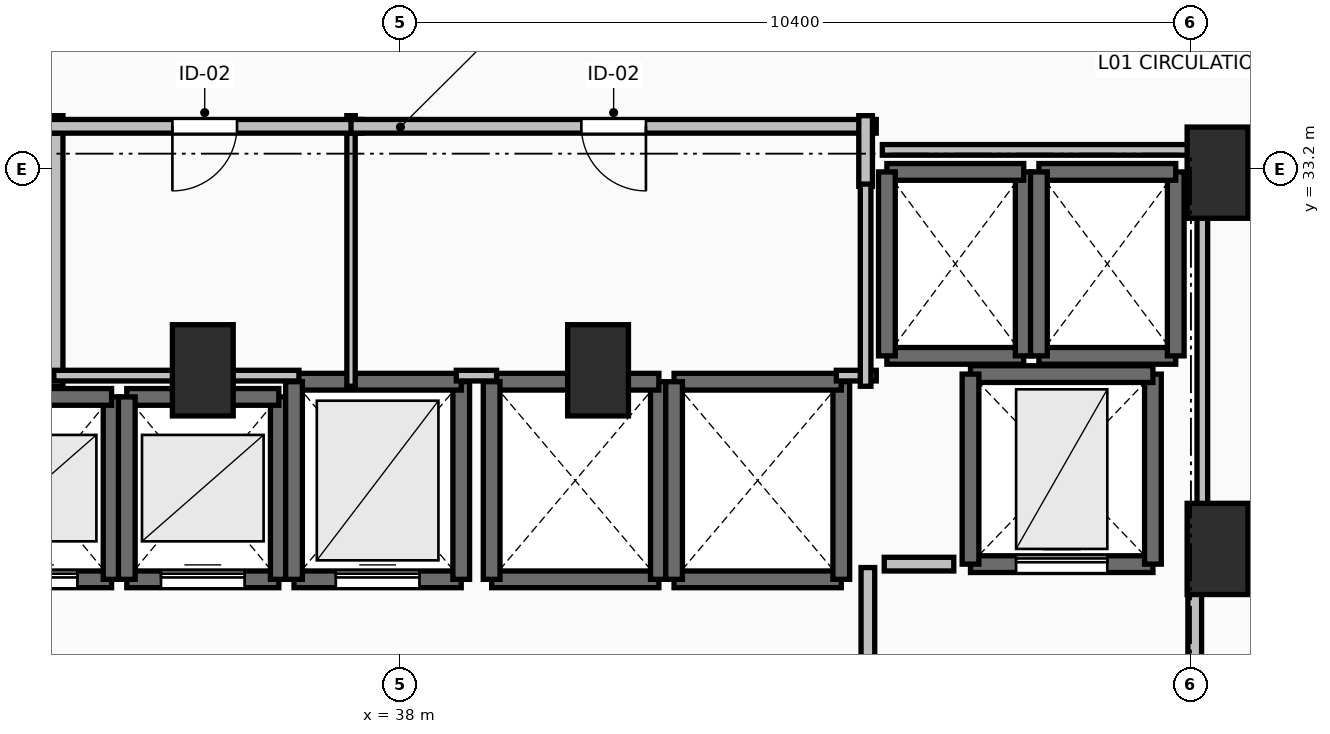
"""IFC4 building model, lengths in metres.
Left out: names, types, materials, properties, quantities, classifications, styles, units other than length and angle.
Written with IfcOpenShell. Run it as: python <this file> out.ifc"""

import sys

from ifc_helpers import new_model, si_unit, direction, frame, frame_2d, origin, origin_2d, place, context, subcontext, project, spatial, rectangle, extrude, element, fill, save


model = new_model("IFC4")
c1 = context("Model", 3, precision=1e-05, world=origin(), true_north=direction((0.0, 1.0)))
c2 = subcontext(c1, "Body", "Model", "MODEL_VIEW")
j1 = project(units=[si_unit("LENGTHUNIT", "METRE"), si_unit("PLANEANGLEUNIT", "RADIAN")], contexts=[c1])
p1 = place(None, origin())
s1 = spatial("IfcSite", under=j1, at=p1, CompositionType="ELEMENT")
p2 = place(p1, origin())
s2 = spatial("IfcBuilding", under=s1, at=p2, CompositionType="ELEMENT")
p3 = place(p2, frame((0.0, 0.0, 4.8)))
s3 = spatial("IfcBuildingStorey", under=s2, at=p3, CompositionType="ELEMENT", Elevation=4.8)
for number, where, z_axis, x_axis in (
    (1, (48.75, 33.15, 0.0), (0.0, 0.0, 1.0), (1.0, 0.0, 0.0)),
    (2, (48.75, 28.2, 0.0), (0.0, 0.0, 1.0), (1.0, 0.0, 0.0)),
    (3, (35.4, 30.55, 0.0), (0.0, 0.0, 1.0), (1.0, 0.0, 0.0)),
    (4, (40.6, 30.55, 0.0), (0.0, 0.0, 1.0), (1.0, 0.0, 0.0)),
):
    element("IfcColumn", number, at=place(p3, frame(where, z_axis=z_axis, x_axis=x_axis)), inside=s3, PredefinedType="PILASTER", context=c2, shape_type="SweptSolid", body=[
        extrude(rectangle(XDim=0.8, YDim=1.2, at=origin_2d()), origin(), (0.0, 0.0, 1.0), 4.8),
    ])
p4 = place(p3, frame((32.2, 27.8, 0.0), z_axis=(0.0, 0.0, 1.0), x_axis=(1.0, 0.0, 0.0)))
e5 = element("IfcWall", 5, at=p4, inside=s3, PredefinedType="SOLIDWALL", context=c2, shape_type="SweptSolid", body=[
    extrude(rectangle(XDim=2.0, YDim=0.22, at=frame_2d((1.0, 0.0))), origin(), (0.0, 0.0, 1.0), 4.48),
])
p5 = place(p4, frame((0.45, 0.0, 0.0)))
e6 = element("IfcOpeningElement", 6, at=p5, cuts=e5, PredefinedType="OPENING", context=c2, shape_type="SweptSolid", body=[
    extrude(rectangle(XDim=1.1, YDim=2.2, at=frame_2d((0.55, 1.1))), frame((0.0, 0.125, 0.0), z_axis=(0.0, -1.0, 0.0), x_axis=(1.0, 0.0, 0.0)), (0.0, 0.0, 1.0), 0.25),
])
p6 = place(p3, frame((34.2, 27.8, 0.0), z_axis=(0.0, 0.0, 1.0), x_axis=(0.0, 1.0, 0.0)))
e7 = element("IfcWall", 7, at=p6, inside=s3, PredefinedType="SOLIDWALL", context=c2, shape_type="SweptSolid", body=[
    extrude(rectangle(XDim=2.4, YDim=0.22, at=frame_2d((1.2, 0.0))), origin(), (0.0, 0.0, 1.0), 4.48),
])
p7 = place(p3, frame((34.2, 30.2, 0.0), z_axis=(0.0, 0.0, 1.0), x_axis=(-1.0, 0.0, 0.0)))
e8 = element("IfcWall", 8, at=p7, inside=s3, PredefinedType="SOLIDWALL", context=c2, shape_type="SweptSolid", body=[
    extrude(rectangle(XDim=2.0, YDim=0.22, at=frame_2d((1.0, 0.0))), origin(), (0.0, 0.0, 1.0), 4.48),
])
p8 = place(p3, frame((34.4, 27.8, 0.0), z_axis=(0.0, 0.0, 1.0), x_axis=(1.0, 0.0, 0.0)))
e9 = element("IfcWall", 9, at=p8, inside=s3, PredefinedType="SOLIDWALL", context=c2, shape_type="SweptSolid", body=[
    extrude(rectangle(XDim=2.0, YDim=0.22, at=frame_2d((1.0, 0.0))), origin(), (0.0, 0.0, 1.0), 4.48),
])
p9 = place(p8, frame((0.45, 0.0, 0.0)))
e10 = element("IfcOpeningElement", 10, at=p9, cuts=e9, PredefinedType="OPENING", context=c2, shape_type="SweptSolid", body=[
    extrude(rectangle(XDim=1.1, YDim=2.2, at=frame_2d((0.55, 1.1))), frame((0.0, 0.125, 0.0), z_axis=(0.0, -1.0, 0.0), x_axis=(1.0, 0.0, 0.0)), (0.0, 0.0, 1.0), 0.25),
])
p10 = place(p3, frame((36.4, 27.8, 0.0), z_axis=(0.0, 0.0, 1.0), x_axis=(0.0, 1.0, 0.0)))
e11 = element("IfcWall", 11, at=p10, inside=s3, PredefinedType="SOLIDWALL", context=c2, shape_type="SweptSolid", body=[
    extrude(rectangle(XDim=2.4, YDim=0.22, at=frame_2d((1.2, 0.0))), origin(), (0.0, 0.0, 1.0), 4.48),
])
p11 = place(p3, frame((36.4, 30.2, 0.0), z_axis=(0.0, 0.0, 1.0), x_axis=(-1.0, 0.0, 0.0)))
e12 = element("IfcWall", 12, at=p11, inside=s3, PredefinedType="SOLIDWALL", context=c2, shape_type="SweptSolid", body=[
    extrude(rectangle(XDim=2.0, YDim=0.22, at=frame_2d((1.0, 0.0))), origin(), (0.0, 0.0, 1.0), 4.48),
])
p12 = place(p3, frame((34.4, 30.2, 0.0), z_axis=(0.0, 0.0, 1.0), x_axis=(0.0, -1.0, 0.0)))
e13 = element("IfcWall", 13, at=p12, inside=s3, PredefinedType="SOLIDWALL", context=c2, shape_type="SweptSolid", body=[
    extrude(rectangle(XDim=2.4, YDim=0.22, at=frame_2d((1.2, 0.0))), origin(), (0.0, 0.0, 1.0), 4.48),
])
p13 = place(p3, frame((36.6, 27.8, 0.0), z_axis=(0.0, 0.0, 1.0), x_axis=(1.0, 0.0, 0.0)))
e14 = element("IfcWall", 14, at=p13, inside=s3, PredefinedType="SOLIDWALL", context=c2, shape_type="SweptSolid", body=[
    extrude(rectangle(XDim=2.2, YDim=0.22, at=frame_2d((1.1, 0.0))), origin(), (0.0, 0.0, 1.0), 4.48),
])
p14 = place(p13, frame((0.55, 0.0, 0.0)))
e15 = element("IfcOpeningElement", 15, at=p14, cuts=e14, PredefinedType="OPENING", context=c2, shape_type="SweptSolid", body=[
    extrude(rectangle(XDim=1.1, YDim=2.2, at=frame_2d((0.55, 1.1))), frame((0.0, 0.125, 0.0), z_axis=(0.0, -1.0, 0.0), x_axis=(1.0, 0.0, 0.0)), (0.0, 0.0, 1.0), 0.25),
])
p15 = place(p3, frame((38.8, 27.8, 0.0), z_axis=(0.0, 0.0, 1.0), x_axis=(0.0, 1.0, 0.0)))
e16 = element("IfcWall", 16, at=p15, inside=s3, PredefinedType="SOLIDWALL", context=c2, shape_type="SweptSolid", body=[
    extrude(rectangle(XDim=2.6, YDim=0.22, at=frame_2d((1.3, 0.0))), origin(), (0.0, 0.0, 1.0), 4.48),
])
p16 = place(p3, frame((38.8, 30.4, 0.0), z_axis=(0.0, 0.0, 1.0), x_axis=(-1.0, 0.0, 0.0)))
e17 = element("IfcWall", 17, at=p16, inside=s3, PredefinedType="SOLIDWALL", context=c2, shape_type="SweptSolid", body=[
    extrude(rectangle(XDim=2.2, YDim=0.22, at=frame_2d((1.1, 0.0))), origin(), (0.0, 0.0, 1.0), 4.48),
])
p17 = place(p3, frame((36.6, 30.4, 0.0), z_axis=(0.0, 0.0, 1.0), x_axis=(0.0, -1.0, 0.0)))
e18 = element("IfcWall", 18, at=p17, inside=s3, PredefinedType="SOLIDWALL", context=c2, shape_type="SweptSolid", body=[
    extrude(rectangle(XDim=2.6, YDim=0.22, at=frame_2d((1.3, 0.0))), origin(), (0.0, 0.0, 1.0), 4.48),
])
p18 = place(p3, frame((39.2, 27.8, 0.0), z_axis=(0.0, 0.0, 1.0), x_axis=(1.0, 0.0, 0.0)))
e19 = element("IfcWall", 19, at=p18, inside=s3, PredefinedType="SOLIDWALL", context=c2, shape_type="SweptSolid", body=[
    extrude(rectangle(XDim=2.2, YDim=0.22, at=frame_2d((1.1, 0.0))), origin(), (0.0, 0.0, 1.0), 4.48),
])
p19 = place(p3, frame((41.4, 27.8, 0.0), z_axis=(0.0, 0.0, 1.0), x_axis=(0.0, 1.0, 0.0)))
e20 = element("IfcWall", 20, at=p19, inside=s3, PredefinedType="SOLIDWALL", context=c2, shape_type="SweptSolid", body=[
    extrude(rectangle(XDim=2.6, YDim=0.22, at=frame_2d((1.3, 0.0))), origin(), (0.0, 0.0, 1.0), 4.48),
])
p20 = place(p3, frame((41.4, 30.4, 0.0), z_axis=(0.0, 0.0, 1.0), x_axis=(-1.0, 0.0, 0.0)))
e21 = element("IfcWall", 21, at=p20, inside=s3, PredefinedType="SOLIDWALL", context=c2, shape_type="SweptSolid", body=[
    extrude(rectangle(XDim=2.2, YDim=0.22, at=frame_2d((1.1, 0.0))), origin(), (0.0, 0.0, 1.0), 4.48),
])
p21 = place(p3, frame((39.2, 30.4, 0.0), z_axis=(0.0, 0.0, 1.0), x_axis=(0.0, -1.0, 0.0)))
e22 = element("IfcWall", 22, at=p21, inside=s3, PredefinedType="SOLIDWALL", context=c2, shape_type="SweptSolid", body=[
    extrude(rectangle(XDim=2.6, YDim=0.22, at=frame_2d((1.3, 0.0))), origin(), (0.0, 0.0, 1.0), 4.48),
])
p22 = place(p3, frame((41.6, 27.8, 0.0), z_axis=(0.0, 0.0, 1.0), x_axis=(1.0, 0.0, 0.0)))
e23 = element("IfcWall", 23, at=p22, inside=s3, PredefinedType="SOLIDWALL", context=c2, shape_type="SweptSolid", body=[
    extrude(rectangle(XDim=2.2, YDim=0.22, at=frame_2d((1.1, 0.0))), origin(), (0.0, 0.0, 1.0), 4.48),
])
p23 = place(p3, frame((43.8, 27.8, 0.0), z_axis=(0.0, 0.0, 1.0), x_axis=(0.0, 1.0, 0.0)))
e24 = element("IfcWall", 24, at=p23, inside=s3, PredefinedType="SOLIDWALL", context=c2, shape_type="SweptSolid", body=[
    extrude(rectangle(XDim=2.6, YDim=0.22, at=frame_2d((1.3, 0.0))), origin(), (0.0, 0.0, 1.0), 4.48),
])
p24 = place(p3, frame((43.8, 30.4, 0.0), z_axis=(0.0, 0.0, 1.0), x_axis=(-1.0, 0.0, 0.0)))
e25 = element("IfcWall", 25, at=p24, inside=s3, PredefinedType="SOLIDWALL", context=c2, shape_type="SweptSolid", body=[
    extrude(rectangle(XDim=2.2, YDim=0.22, at=frame_2d((1.1, 0.0))), origin(), (0.0, 0.0, 1.0), 4.48),
])
p25 = place(p3, frame((41.6, 30.4, 0.0), z_axis=(0.0, 0.0, 1.0), x_axis=(0.0, -1.0, 0.0)))
e26 = element("IfcWall", 26, at=p25, inside=s3, PredefinedType="SOLIDWALL", context=c2, shape_type="SweptSolid", body=[
    extrude(rectangle(XDim=2.6, YDim=0.22, at=frame_2d((1.3, 0.0))), origin(), (0.0, 0.0, 1.0), 4.48),
])
p26 = place(p3, frame((44.4, 30.74, 0.0), z_axis=(0.0, 0.0, 1.0), x_axis=(1.0, 0.0, 0.0)))
e27 = element("IfcWall", 27, at=p26, inside=s3, PredefinedType="SOLIDWALL", context=c2, shape_type="SweptSolid", body=[
    extrude(rectangle(XDim=1.8, YDim=0.22, at=frame_2d((0.9, 0.0))), origin(), (0.0, 0.0, 1.0), 4.48),
])
p27 = place(p3, frame((46.2, 30.74, 0.0), z_axis=(0.0, 0.0, 1.0), x_axis=(0.0, 1.0, 0.0)))
e28 = element("IfcWall", 28, at=p27, inside=s3, PredefinedType="SOLIDWALL", context=c2, shape_type="SweptSolid", body=[
    extrude(rectangle(XDim=2.42, YDim=0.22, at=frame_2d((1.21, 0.0))), origin(), (0.0, 0.0, 1.0), 4.48),
])
p28 = place(p3, frame((46.2, 33.16, 0.0), z_axis=(0.0, 0.0, 1.0), x_axis=(-1.0, 0.0, 0.0)))
e29 = element("IfcWall", 29, at=p28, inside=s3, PredefinedType="SOLIDWALL", context=c2, shape_type="SweptSolid", body=[
    extrude(rectangle(XDim=1.8, YDim=0.22, at=frame_2d((0.9, 0.0))), origin(), (0.0, 0.0, 1.0), 4.48),
])
p29 = place(p3, frame((44.4, 33.16, 0.0), z_axis=(0.0, 0.0, 1.0), x_axis=(0.0, -1.0, 0.0)))
e30 = element("IfcWall", 30, at=p29, inside=s3, PredefinedType="SOLIDWALL", context=c2, shape_type="SweptSolid", body=[
    extrude(rectangle(XDim=2.42, YDim=0.22, at=frame_2d((1.21, 0.0))), origin(), (0.0, 0.0, 1.0), 4.48),
])
p30 = place(p3, frame((46.4, 30.74, 0.0), z_axis=(0.0, 0.0, 1.0), x_axis=(1.0, 0.0, 0.0)))
e31 = element("IfcWall", 31, at=p30, inside=s3, PredefinedType="SOLIDWALL", context=c2, shape_type="SweptSolid", body=[
    extrude(rectangle(XDim=1.8, YDim=0.22, at=frame_2d((0.9, 0.0))), origin(), (0.0, 0.0, 1.0), 4.48),
])
p31 = place(p3, frame((48.2, 30.74, 0.0), z_axis=(0.0, 0.0, 1.0), x_axis=(0.0, 1.0, 0.0)))
e32 = element("IfcWall", 32, at=p31, inside=s3, PredefinedType="SOLIDWALL", context=c2, shape_type="SweptSolid", body=[
    extrude(rectangle(XDim=2.42, YDim=0.22, at=frame_2d((1.21, 0.0))), origin(), (0.0, 0.0, 1.0), 4.48),
])
p32 = place(p3, frame((48.2, 33.16, 0.0), z_axis=(0.0, 0.0, 1.0), x_axis=(-1.0, 0.0, 0.0)))
e33 = element("IfcWall", 33, at=p32, inside=s3, PredefinedType="SOLIDWALL", context=c2, shape_type="SweptSolid", body=[
    extrude(rectangle(XDim=1.8, YDim=0.22, at=frame_2d((0.9, 0.0))), origin(), (0.0, 0.0, 1.0), 4.48),
])
p33 = place(p3, frame((46.4, 33.16, 0.0), z_axis=(0.0, 0.0, 1.0), x_axis=(0.0, -1.0, 0.0)))
e34 = element("IfcWall", 34, at=p33, inside=s3, PredefinedType="SOLIDWALL", context=c2, shape_type="SweptSolid", body=[
    extrude(rectangle(XDim=2.42, YDim=0.22, at=frame_2d((1.21, 0.0))), origin(), (0.0, 0.0, 1.0), 4.48),
])
p34 = place(p3, frame((45.5, 28.0, 0.0), z_axis=(0.0, 0.0, 1.0), x_axis=(1.0, 0.0, 0.0)))
e35 = element("IfcWall", 35, at=p34, inside=s3, PredefinedType="SHEAR", context=c2, shape_type="SweptSolid", body=[
    extrude(rectangle(XDim=2.4, YDim=0.22, at=frame_2d((1.2, 0.0))), origin(), (0.0, 0.0, 1.0), 4.48),
])
p35 = place(p34, frame((0.6, 0.0, 0.0)))
e36 = element("IfcOpeningElement", 36, at=p35, cuts=e35, PredefinedType="OPENING", context=c2, shape_type="SweptSolid", body=[
    extrude(rectangle(XDim=1.2, YDim=2.2, at=frame_2d((0.6, 1.1))), frame((0.0, 0.125, 0.0), z_axis=(0.0, -1.0, 0.0), x_axis=(1.0, 0.0, 0.0)), (0.0, 0.0, 1.0), 0.25),
])
p36 = place(p3, frame((47.9, 28.0, 0.0), z_axis=(0.0, 0.0, 1.0), x_axis=(0.0, 1.0, 0.0)))
e37 = element("IfcWall", 37, at=p36, inside=s3, PredefinedType="SHEAR", context=c2, shape_type="SweptSolid", body=[
    extrude(rectangle(XDim=2.5, YDim=0.22, at=frame_2d((1.25, 0.0))), origin(), (0.0, 0.0, 1.0), 4.48),
])
p37 = place(p3, frame((47.9, 30.5, 0.0), z_axis=(0.0, 0.0, 1.0), x_axis=(-1.0, 0.0, 0.0)))
e38 = element("IfcWall", 38, at=p37, inside=s3, PredefinedType="SHEAR", context=c2, shape_type="SweptSolid", body=[
    extrude(rectangle(XDim=2.4, YDim=0.22, at=frame_2d((1.2, 0.0))), origin(), (0.0, 0.0, 1.0), 4.48),
])
p38 = place(p3, frame((45.5, 30.5, 0.0), z_axis=(0.0, 0.0, 1.0), x_axis=(0.0, -1.0, 0.0)))
e39 = element("IfcWall", 39, at=p38, inside=s3, PredefinedType="SHEAR", context=c2, shape_type="SweptSolid", body=[
    extrude(rectangle(XDim=2.5, YDim=0.22, at=frame_2d((1.25, 0.0))), origin(), (0.0, 0.0, 1.0), 4.48),
])
p39 = place(p3, frame((44.15, 27.955, 0.0), z_axis=(0.0, 0.0, 1.0), x_axis=(0.0, -1.0, 0.0)))
e40 = element("IfcWall", 40, at=p39, inside=s3, PredefinedType="PARTITIONING", context=c2, shape_type="SweptSolid", body=[
    extrude(rectangle(XDim=3.91, YDim=0.18, at=frame_2d((1.955, 0.0))), origin(), (0.0, 0.0, 1.0), 4.48),
])
p40 = place(p39, frame((1.355, 0.0, 0.0)))
e41 = element("IfcOpeningElement", 41, at=p40, cuts=e40, PredefinedType="OPENING", context=c2, shape_type="SweptSolid", body=[
    extrude(rectangle(XDim=1.2, YDim=2.15, at=frame_2d((0.6, 1.075))), frame((0.0, 0.105, 0.0), z_axis=(0.0, -1.0, 0.0), x_axis=(1.0, 0.0, 0.0)), (0.0, 0.0, 1.0), 0.21),
])
p41 = place(p3, frame((48.45, 23.95, 0.0), z_axis=(0.0, 0.0, 1.0), x_axis=(0.0, 1.0, 0.0)))
e42 = element("IfcWall", 42, at=p41, inside=s3, PredefinedType="PARTITIONING", context=c2, shape_type="SweptSolid", body=[
    extrude(rectangle(XDim=4.05, YDim=0.18, at=frame_2d((2.025, 0.0))), origin(), (0.0, 0.0, 1.0), 4.48),
])
p42 = place(p41, frame((1.425, 0.0, 0.0)))
e43 = element("IfcOpeningElement", 43, at=p42, cuts=e42, PredefinedType="OPENING", context=c2, shape_type="SweptSolid", body=[
    extrude(rectangle(XDim=1.2, YDim=2.15, at=frame_2d((0.6, 1.075))), frame((0.0, 0.105, 0.0), z_axis=(0.0, -1.0, 0.0), x_axis=(1.0, 0.0, 0.0)), (0.0, 0.0, 1.0), 0.21),
])
p43 = place(p3, frame((33.47, 30.34, 0.0), z_axis=(0.0, 0.0, 1.0), x_axis=(0.0, 1.0, 0.0)))
e44 = element("IfcWall", 44, at=p43, inside=s3, PredefinedType="PARTITIONING", context=c2, shape_type="SweptSolid", body=[
    extrude(rectangle(XDim=3.56, YDim=0.18, at=frame_2d((1.78, 0.0))), origin(), (0.0, 0.0, 1.0), 4.48),
])
p44 = place(p3, frame((33.47, 33.76, 0.0), z_axis=(0.0, 0.0, 1.0), x_axis=(-1.0, 0.0, 0.0)))
e45 = element("IfcWall", 45, at=p44, inside=s3, PredefinedType="PARTITIONING", context=c2, shape_type="SweptSolid", body=[
    extrude(rectangle(XDim=2.27, YDim=0.18, at=frame_2d((1.135, 0.0))), origin(), (0.0, 0.0, 1.0), 4.48),
])
p45 = place(p44, frame((0.535, 0.0, 0.0)))
e46 = element("IfcOpeningElement", 46, at=p45, cuts=e45, PredefinedType="OPENING", context=c2, shape_type="SweptSolid", body=[
    extrude(rectangle(XDim=1.2, YDim=2.15, at=frame_2d((0.6, 1.075))), frame((0.0, 0.105, 0.0), z_axis=(0.0, -1.0, 0.0), x_axis=(1.0, 0.0, 0.0)), (0.0, 0.0, 1.0), 0.21),
])
p46 = place(p3, frame((37.35, 30.34, 0.0), z_axis=(0.0, 0.0, 1.0), x_axis=(0.0, 1.0, 0.0)))
e47 = element("IfcWall", 47, at=p46, inside=s3, PredefinedType="PARTITIONING", context=c2, shape_type="SweptSolid", body=[
    extrude(rectangle(XDim=3.56, YDim=0.11, at=frame_2d((1.78, 0.0))), origin(), (0.0, 0.0, 1.0), 3.672),
])
p47 = place(p3, frame((37.49, 33.76, 0.0), z_axis=(0.0, 0.0, 1.0), x_axis=(-1.0, 0.0, 0.0)))
e48 = element("IfcWall", 48, at=p47, inside=s3, PredefinedType="PARTITIONING", context=c2, shape_type="SweptSolid", body=[
    extrude(rectangle(XDim=4.13, YDim=0.18, at=frame_2d((2.065, 0.0))), origin(), (0.0, 0.0, 1.0), 4.48),
])
p48 = place(p47, frame((1.64, 0.0, 0.0)))
e49 = element("IfcOpeningElement", 49, at=p48, cuts=e48, PredefinedType="OPENING", context=c2, shape_type="SweptSolid", body=[
    extrude(rectangle(XDim=0.85, YDim=2.1, at=frame_2d((0.425, 1.05))), frame((0.0, 0.105, 0.0), z_axis=(0.0, -1.0, 0.0), x_axis=(1.0, 0.0, 0.0)), (0.0, 0.0, 1.0), 0.21),
])
p49 = place(p3, frame((44.26, 33.76, 0.0), z_axis=(0.0, 0.0, 1.0), x_axis=(-1.0, 0.0, 0.0)))
e50 = element("IfcWall", 50, at=p49, inside=s3, PredefinedType="PARTITIONING", context=c2, shape_type="SweptSolid", body=[
    extrude(rectangle(XDim=6.91, YDim=0.18, at=frame_2d((3.455, 0.0))), origin(), (0.0, 0.0, 1.0), 4.48),
])
p50 = place(p49, frame((3.03, 0.0, 0.0)))
e51 = element("IfcOpeningElement", 51, at=p50, cuts=e50, PredefinedType="OPENING", context=c2, shape_type="SweptSolid", body=[
    extrude(rectangle(XDim=0.85, YDim=2.1, at=frame_2d((0.425, 1.05))), frame((0.0, 0.105, 0.0), z_axis=(0.0, -1.0, 0.0), x_axis=(1.0, 0.0, 0.0)), (0.0, 0.0, 1.0), 0.21),
])
p51 = place(p3, frame((44.12, 32.97, 0.0), z_axis=(0.0, 0.0, 1.0), x_axis=(0.0, 1.0, 0.0)))
e52 = element("IfcWall", 52, at=p51, inside=s3, PredefinedType="PARTITIONING", context=c2, shape_type="SweptSolid", body=[
    extrude(rectangle(XDim=0.93, YDim=0.18, at=frame_2d((0.465, 0.0))), origin(), (0.0, 0.0, 1.0), 4.48),
])
p52 = place(p3, frame((45.28, 28.0, 0.0), z_axis=(0.0, 0.0, 1.0), x_axis=(-1.0, 0.0, 0.0)))
e53 = element("IfcWall", 53, at=p52, inside=s3, PredefinedType="PARTITIONING", context=c2, shape_type="SweptSolid", body=[
    extrude(rectangle(XDim=0.915, YDim=0.18, at=frame_2d((0.458, 0.0))), origin(), (0.0, 0.0, 1.0), 4.48),
])
p53 = place(p3, frame((33.44, 30.48, 0.0), z_axis=(0.0, 0.0, 1.0), x_axis=(1.0, 0.0, 0.0)))
e54 = element("IfcWall", 54, at=p53, inside=s3, PredefinedType="PARTITIONING", context=c2, shape_type="SweptSolid", body=[
    extrude(rectangle(XDim=3.225, YDim=0.14, at=frame_2d((1.613, 0.0))), origin(), (0.0, 0.0, 1.0), 3.672),
])
p54 = place(p3, frame((38.735, 30.48, 0.0), z_axis=(0.0, 0.0, 1.0), x_axis=(1.0, 0.0, 0.0)))
e55 = element("IfcWall", 55, at=p54, inside=s3, PredefinedType="PARTITIONING", context=c2, shape_type="SweptSolid", body=[
    extrude(rectangle(XDim=0.53, YDim=0.14, at=frame_2d((0.265, 0.0))), origin(), (0.0, 0.0, 1.0), 3.672),
])
p55 = place(p3, frame((43.735, 30.48, 0.0), z_axis=(0.0, 0.0, 1.0), x_axis=(1.0, 0.0, 0.0)))
e56 = element("IfcWall", 56, at=p55, inside=s3, PredefinedType="PARTITIONING", context=c2, shape_type="SweptSolid", body=[
    extrude(rectangle(XDim=0.525, YDim=0.14, at=frame_2d((0.262, 0.0))), origin(), (0.0, 0.0, 1.0), 4.48),
])
p56 = place(p3, frame((44.12, 30.34, 0.0), z_axis=(0.0, 0.0, 1.0), x_axis=(0.0, 1.0, 0.0)))
e57 = element("IfcWall", 57, at=p56, inside=s3, PredefinedType="PARTITIONING", context=c2, shape_type="SweptSolid", body=[
    extrude(rectangle(XDim=2.66, YDim=0.14, at=frame_2d((1.33, 0.0))), origin(), (0.0, 0.0, 1.0), 4.48),
])
p57 = place(p3, frame((44.34, 33.45, 0.0), z_axis=(0.0, 0.0, 1.0), x_axis=(1.0, 0.0, 0.0)))
e58 = element("IfcWall", 58, at=p57, inside=s3, PredefinedType="PARTITIONING", context=c2, shape_type="SweptSolid", body=[
    extrude(rectangle(XDim=4.21, YDim=0.14, at=frame_2d((2.105, 0.0))), origin(), (0.0, 0.0, 1.0), 3.672),
])
p58 = place(p3, frame((48.55, 33.45, 0.0), z_axis=(0.0, 0.0, 1.0), x_axis=(0.0, -1.0, 0.0)))
e59 = element("IfcWall", 59, at=p58, inside=s3, PredefinedType="PARTITIONING", context=c2, shape_type="SweptSolid", body=[
    extrude(rectangle(XDim=5.254, YDim=0.14, at=frame_2d((2.627, 0.0))), origin(), (0.0, 0.0, 1.0), 3.672),
])
p59 = place(p5, origin())
e60 = element("IfcDoor", 60, at=p59, inside=s3, OperationType="SLIDING_TO_LEFT", PredefinedType="DOOR", context=c2, shape_type="SweptSolid", body=[
    extrude(rectangle(XDim=1.1, YDim=2.2, at=frame_2d((0.55, 1.1))), frame((0.0, 0.025, 0.0), z_axis=(0.0, -1.0, 0.0), x_axis=(1.0, 0.0, 0.0)), (0.0, 0.0, 1.0), 0.05),
])
fill(e6, e60)
p60 = place(p9, origin())
e61 = element("IfcDoor", 61, at=p60, inside=s3, OperationType="SLIDING_TO_LEFT", PredefinedType="DOOR", context=c2, shape_type="SweptSolid", body=[
    extrude(rectangle(XDim=1.1, YDim=2.2, at=frame_2d((0.55, 1.1))), frame((0.0, 0.025, 0.0), z_axis=(0.0, -1.0, 0.0), x_axis=(1.0, 0.0, 0.0)), (0.0, 0.0, 1.0), 0.05),
])
fill(e10, e61)
p61 = place(p14, origin())
e62 = element("IfcDoor", 62, at=p61, inside=s3, OperationType="SLIDING_TO_LEFT", PredefinedType="DOOR", context=c2, shape_type="SweptSolid", body=[
    extrude(rectangle(XDim=1.1, YDim=2.2, at=frame_2d((0.55, 1.1))), frame((0.0, 0.025, 0.0), z_axis=(0.0, -1.0, 0.0), x_axis=(1.0, 0.0, 0.0)), (0.0, 0.0, 1.0), 0.05),
])
fill(e15, e62)
p62 = place(p35, origin())
e63 = element("IfcDoor", 63, at=p62, inside=s3, OperationType="SLIDING_TO_LEFT", PredefinedType="DOOR", context=c2, shape_type="SweptSolid", body=[
    extrude(rectangle(XDim=1.2, YDim=2.2, at=frame_2d((0.6, 1.1))), frame((0.0, 0.025, 0.0), z_axis=(0.0, -1.0, 0.0), x_axis=(1.0, 0.0, 0.0)), (0.0, 0.0, 1.0), 0.05),
])
fill(e36, e63)
p63 = place(p48, origin())
e64 = element("IfcDoor", 64, at=p63, inside=s3, OperationType="SINGLE_SWING_RIGHT", PredefinedType="DOOR", context=c2, shape_type="SweptSolid", body=[
    extrude(rectangle(XDim=0.85, YDim=2.1, at=frame_2d((0.425, 1.05))), frame((0.0, 0.025, 0.0), z_axis=(0.0, -1.0, 0.0), x_axis=(1.0, 0.0, 0.0)), (0.0, 0.0, 1.0), 0.05),
])
fill(e49, e64)
p64 = place(p50, origin())
e65 = element("IfcDoor", 65, at=p64, inside=s3, OperationType="SINGLE_SWING_LEFT", PredefinedType="DOOR", context=c2, shape_type="SweptSolid", body=[
    extrude(rectangle(XDim=0.85, YDim=2.1, at=frame_2d((0.425, 1.05))), frame((0.0, 0.025, 0.0), z_axis=(0.0, -1.0, 0.0), x_axis=(1.0, 0.0, 0.0)), (0.0, 0.0, 1.0), 0.05),
])
fill(e51, e65)
save(model, sys.argv[1])
